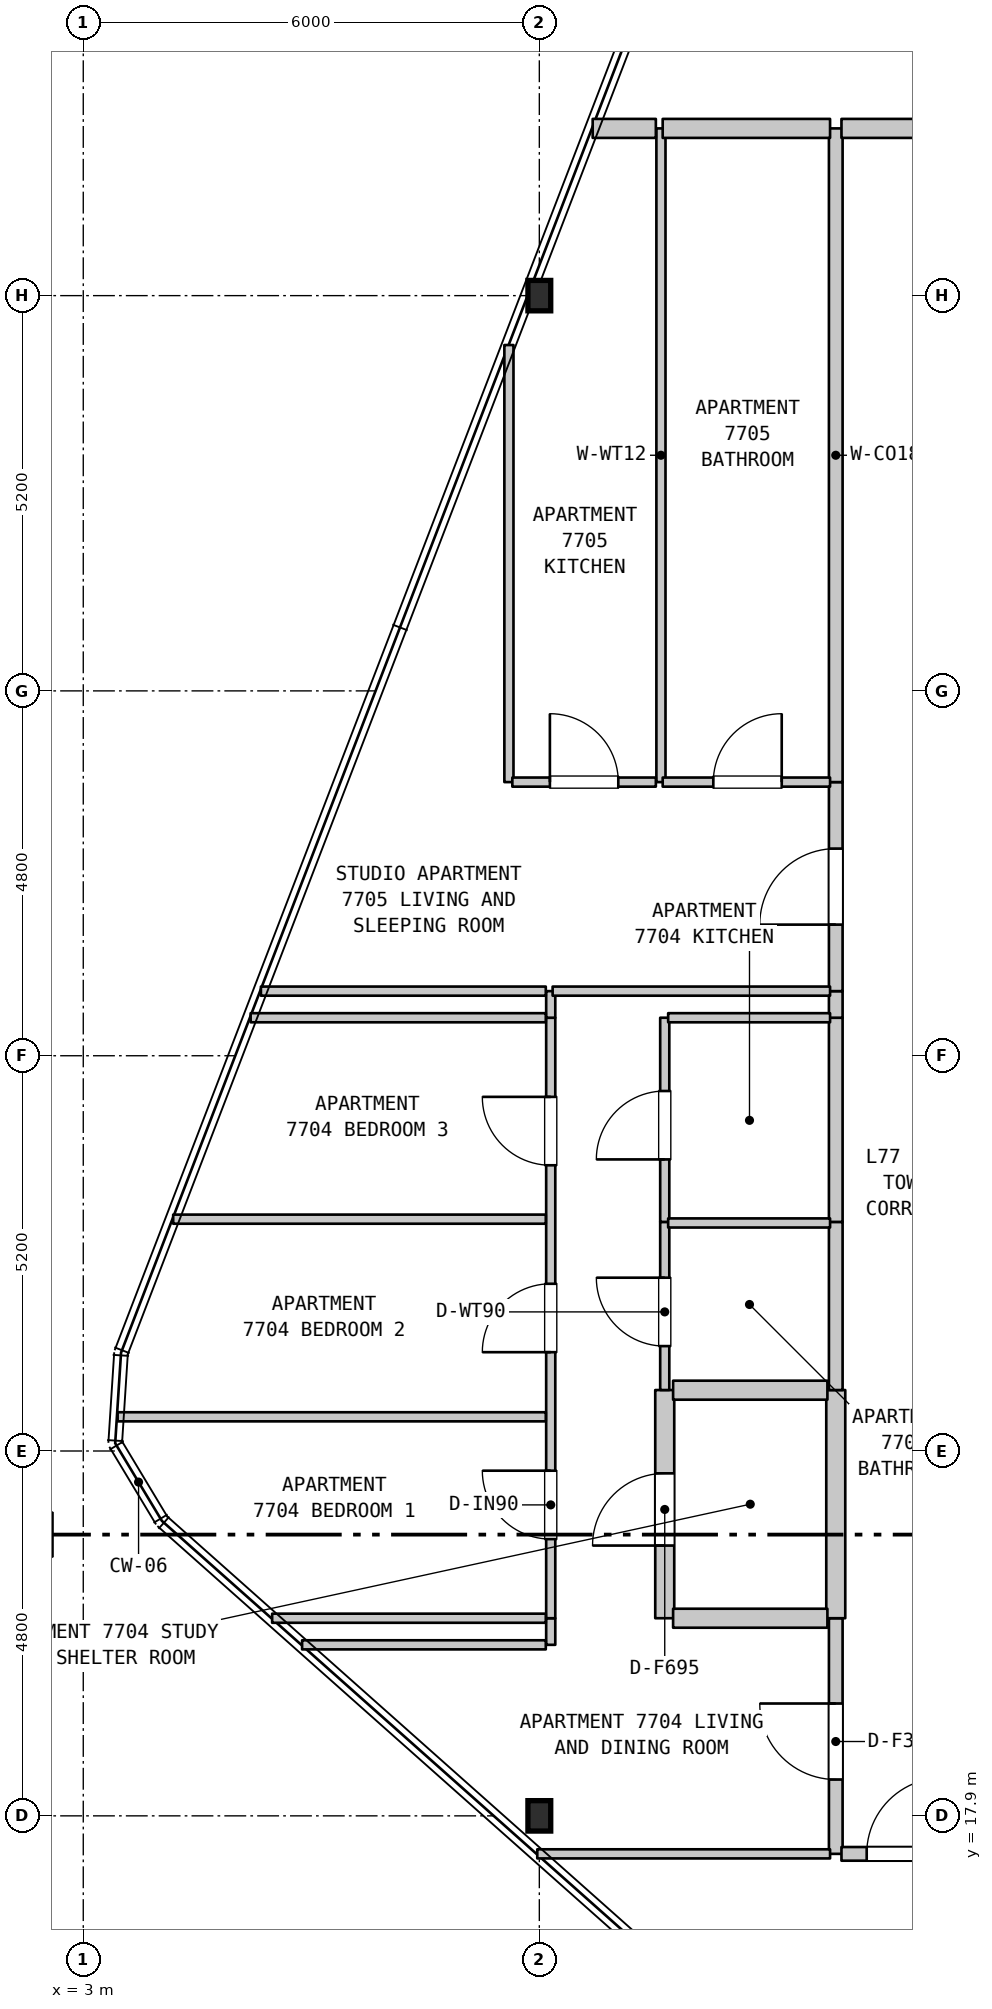
"""IFC4 building model, lengths in metres.
Left out: names, types, materials, properties, quantities, classifications, styles, units other than length and angle.
Written with IfcOpenShell. Run it as: python <this file> out.ifc"""

import sys

from ifc_helpers import new_model, si_unit, direction, frame, frame_2d, origin, origin_2d, place, context, subcontext, project, spatial, rectangle, i_section, extrude, element, fill, save


model = new_model("IFC4")
c1 = context("Model", 3, precision=1e-05, world=origin(), true_north=direction((0.0, 1.0)))
c2 = subcontext(c1, "Body", "Model", "MODEL_VIEW")
j1 = project(units=[si_unit("LENGTHUNIT", "METRE"), si_unit("PLANEANGLEUNIT", "RADIAN")], contexts=[c1])
p1 = place(None, origin())
s1 = spatial("IfcSite", under=j1, at=p1, CompositionType="ELEMENT")
p2 = place(p1, origin())
s2 = spatial("IfcBuilding", under=s1, at=p2, CompositionType="ELEMENT")
p3 = place(p2, frame((0.0, 0.0, 307.3)))
s3 = spatial("IfcBuildingStorey", under=s2, at=p3, CompositionType="ELEMENT", Elevation=307.3)
for number, where, z_axis, x_axis in (
    (1, (9.0, 17.9, 0.0), (0.0, 0.0, 1.0), (1.0, 0.0, 0.0)),
    (2, (9.0, 37.9, 0.0), (0.0, 0.0, 1.0), (1.0, 0.0, 0.0)),
):
    element("IfcColumn", number, at=place(p3, frame(where, z_axis=z_axis, x_axis=x_axis)), inside=s3, PredefinedType="COLUMN", context=c2, shape_type="SweptSolid", body=[
        extrude(i_section(OverallWidth=0.3, OverallDepth=0.4, WebThickness=0.013, FlangeThickness=0.024, FilletRadius=0.027, at=origin_2d()), origin(), (0.0, 0.0, 1.0), 3.7),
    ])
p4 = place(p3, frame((8.6, 31.5, 0.0), z_axis=(0.0, 0.0, 1.0), x_axis=(0.0, 1.0, 0.0)))
e3 = element("IfcWall", 3, at=p4, inside=s3, PredefinedType="PARTITIONING", context=c2, shape_type="SweptSolid", body=[
    extrude(rectangle(XDim=5.75, YDim=0.12, at=frame_2d((2.875, 0.0))), origin(), (0.0, 0.0, 1.0), 3.39),
])
p5 = place(p3, frame((9.15, 20.15, 0.0), z_axis=(0.0, 0.0, 1.0), x_axis=(0.0, 1.0, 0.0)))
e4 = element("IfcWall", 4, at=p5, inside=s3, PredefinedType="PARTITIONING", context=c2, shape_type="SweptSolid", body=[
    extrude(rectangle(XDim=0.35, YDim=0.12, at=frame_2d((0.175, 0.0))), origin(), (0.0, 0.0, 1.0), 3.39),
])
p6 = place(p3, frame((9.15, 20.5, 0.0), z_axis=(0.0, 0.0, 1.0), x_axis=(0.0, 1.0, 0.0)))
e5 = element("IfcWall", 5, at=p6, inside=s3, PredefinedType="PARTITIONING", context=c2, shape_type="SweptSolid", body=[
    extrude(rectangle(XDim=7.9, YDim=0.12, at=frame_2d((3.95, 0.0))), origin(), (0.0, 0.0, 1.0), 2.79),
])
p7 = place(p6, frame((1.041, 0.0, 0.0)))
e6 = element("IfcOpeningElement", 6, at=p7, cuts=e5, PredefinedType="OPENING", context=c2, shape_type="SweptSolid", body=[
    extrude(rectangle(XDim=0.9, YDim=2.15, at=frame_2d((0.45, 1.075))), frame((0.0, 0.07, 0.0), z_axis=(0.0, -1.0, 0.0), x_axis=(1.0, 0.0, 0.0)), (0.0, 0.0, 1.0), 0.14),
])
p8 = place(p6, frame((3.5, 0.0, 0.0)))
e7 = element("IfcOpeningElement", 7, at=p8, cuts=e5, PredefinedType="OPENING", context=c2, shape_type="SweptSolid", body=[
    extrude(rectangle(XDim=0.9, YDim=2.15, at=frame_2d((0.45, 1.075))), frame((0.0, 0.07, 0.0), z_axis=(0.0, -1.0, 0.0), x_axis=(1.0, 0.0, 0.0)), (0.0, 0.0, 1.0), 0.14),
])
p9 = place(p6, frame((5.959, 0.0, 0.0)))
e8 = element("IfcOpeningElement", 8, at=p9, cuts=e5, PredefinedType="OPENING", context=c2, shape_type="SweptSolid", body=[
    extrude(rectangle(XDim=0.9, YDim=2.15, at=frame_2d((0.45, 1.075))), frame((0.0, 0.07, 0.0), z_axis=(0.0, -1.0, 0.0), x_axis=(1.0, 0.0, 0.0)), (0.0, 0.0, 1.0), 0.14),
])
p10 = place(p3, frame((9.15, 28.4, 0.0), z_axis=(0.0, 0.0, 1.0), x_axis=(0.0, 1.0, 0.0)))
e9 = element("IfcWall", 9, at=p10, inside=s3, PredefinedType="PARTITIONING", context=c2, shape_type="SweptSolid", body=[
    extrude(rectangle(XDim=0.35, YDim=0.12, at=frame_2d((0.175, 0.0))), origin(), (0.0, 0.0, 1.0), 3.39),
])
p11 = place(p3, frame((10.6, 31.5, 0.0), z_axis=(0.0, 0.0, 1.0), x_axis=(0.0, 1.0, 0.0)))
e10 = element("IfcWall", 10, at=p11, inside=s3, PredefinedType="PARTITIONING", context=c2, shape_type="SweptSolid", body=[
    extrude(rectangle(XDim=8.6, YDim=0.12, at=frame_2d((4.3, 0.0))), origin(), (0.0, 0.0, 1.0), 3.39),
])
p12 = place(p3, frame((10.65, 20.5, 0.0), z_axis=(0.0, 0.0, 1.0), x_axis=(0.0, 1.0, 0.0)))
e11 = element("IfcWall", 11, at=p12, inside=s3, PredefinedType="STANDARD", context=c2, shape_type="SweptSolid", body=[
    extrude(rectangle(XDim=3.002, YDim=0.25, at=frame_2d((1.501, 0.0))), origin(), (0.0, 0.0, 1.0), 3.39),
])
p13 = place(p12, frame((0.956, 0.0, 0.0)))
e12 = element("IfcOpeningElement", 12, at=p13, cuts=e11, PredefinedType="OPENING", context=c2, shape_type="SweptSolid", body=[
    extrude(rectangle(XDim=0.95, YDim=2.15, at=frame_2d((0.475, 1.075))), frame((0.0, 0.135, 0.0), z_axis=(0.0, -1.0, 0.0), x_axis=(1.0, 0.0, 0.0)), (0.0, 0.0, 1.0), 0.27),
])
p14 = place(p3, frame((10.65, 23.502, 0.0), z_axis=(0.0, 0.0, 1.0), x_axis=(0.0, 1.0, 0.0)))
e13 = element("IfcWall", 13, at=p14, inside=s3, PredefinedType="PARTITIONING", context=c2, shape_type="SweptSolid", body=[
    extrude(rectangle(XDim=2.212, YDim=0.12, at=frame_2d((1.106, 0.0))), origin(), (0.0, 0.0, 1.0), 3.39),
])
p15 = place(p14, frame((0.578, 0.0, 0.0)))
e14 = element("IfcOpeningElement", 14, at=p15, cuts=e13, PredefinedType="OPENING", context=c2, shape_type="SweptSolid", body=[
    extrude(rectangle(XDim=0.9, YDim=2.1, at=frame_2d((0.45, 1.05))), frame((0.0, 0.07, 0.0), z_axis=(0.0, -1.0, 0.0), x_axis=(1.0, 0.0, 0.0)), (0.0, 0.0, 1.0), 0.14),
])
p16 = place(p3, frame((10.65, 25.714, 0.0), z_axis=(0.0, 0.0, 1.0), x_axis=(0.0, 1.0, 0.0)))
e15 = element("IfcWall", 15, at=p16, inside=s3, PredefinedType="PARTITIONING", context=c2, shape_type="SweptSolid", body=[
    extrude(rectangle(XDim=2.686, YDim=0.12, at=frame_2d((1.343, 0.0))), origin(), (0.0, 0.0, 1.0), 3.39),
])
p17 = place(p16, frame((0.822, 0.0, 0.0)))
e16 = element("IfcOpeningElement", 16, at=p17, cuts=e15, PredefinedType="OPENING", context=c2, shape_type="SweptSolid", body=[
    extrude(rectangle(XDim=0.9, YDim=2.15, at=frame_2d((0.45, 1.075))), frame((0.0, 0.07, 0.0), z_axis=(0.0, -1.0, 0.0), x_axis=(1.0, 0.0, 0.0)), (0.0, 0.0, 1.0), 0.14),
])
p18 = place(p3, frame((12.9, 17.4, 0.0), z_axis=(0.0, 0.0, 1.0), x_axis=(0.0, 1.0, 0.0)))
e17 = element("IfcWall", 17, at=p18, inside=s3, PredefinedType="STANDARD", context=c2, shape_type="SweptSolid", body=[
    extrude(rectangle(XDim=3.1, YDim=0.18, at=frame_2d((1.55, 0.0))), origin(), (0.0, 0.0, 1.0), 3.39),
])
p19 = place(p18, frame((0.978, 0.0, 0.0)))
e18 = element("IfcOpeningElement", 18, at=p19, cuts=e17, PredefinedType="OPENING", context=c2, shape_type="SweptSolid", body=[
    extrude(rectangle(XDim=1.0, YDim=2.15, at=frame_2d((0.5, 1.075))), frame((0.0, 0.1, 0.0), z_axis=(0.0, -1.0, 0.0), x_axis=(1.0, 0.0, 0.0)), (0.0, 0.0, 1.0), 0.2),
])
p20 = place(p3, frame((12.9, 20.5, 0.0), z_axis=(0.0, 0.0, 1.0), x_axis=(0.0, 1.0, 0.0)))
e19 = element("IfcWall", 19, at=p20, inside=s3, PredefinedType="STANDARD", context=c2, shape_type="SweptSolid", body=[
    extrude(rectangle(XDim=3.002, YDim=0.25, at=frame_2d((1.501, 0.0))), origin(), (0.0, 0.0, 1.0), 3.39),
])
p21 = place(p3, frame((12.9, 23.502, 0.0), z_axis=(0.0, 0.0, 1.0), x_axis=(0.0, 1.0, 0.0)))
e20 = element("IfcWall", 20, at=p21, inside=s3, PredefinedType="STANDARD", context=c2, shape_type="SweptSolid", body=[
    extrude(rectangle(XDim=2.212, YDim=0.18, at=frame_2d((1.106, 0.0))), origin(), (0.0, 0.0, 1.0), 3.39),
])
p22 = place(p3, frame((12.9, 25.714, 0.0), z_axis=(0.0, 0.0, 1.0), x_axis=(0.0, 1.0, 0.0)))
e21 = element("IfcWall", 21, at=p22, inside=s3, PredefinedType="STANDARD", context=c2, shape_type="SweptSolid", body=[
    extrude(rectangle(XDim=2.686, YDim=0.18, at=frame_2d((1.343, 0.0))), origin(), (0.0, 0.0, 1.0), 3.39),
])
p23 = place(p3, frame((12.9, 28.4, 0.0), z_axis=(0.0, 0.0, 1.0), x_axis=(0.0, 1.0, 0.0)))
e22 = element("IfcWall", 22, at=p23, inside=s3, PredefinedType="STANDARD", context=c2, shape_type="SweptSolid", body=[
    extrude(rectangle(XDim=0.35, YDim=0.18, at=frame_2d((0.175, 0.0))), origin(), (0.0, 0.0, 1.0), 3.39),
])
p24 = place(p3, frame((12.9, 28.75, 0.0), z_axis=(0.0, 0.0, 1.0), x_axis=(0.0, 1.0, 0.0)))
e23 = element("IfcWall", 23, at=p24, inside=s3, PredefinedType="STANDARD", context=c2, shape_type="SweptSolid", body=[
    extrude(rectangle(XDim=2.75, YDim=0.18, at=frame_2d((1.375, 0.0))), origin(), (0.0, 0.0, 1.0), 3.39),
])
p25 = place(p24, frame((0.875, 0.0, 0.0)))
e24 = element("IfcOpeningElement", 24, at=p25, cuts=e23, PredefinedType="OPENING", context=c2, shape_type="SweptSolid", body=[
    extrude(rectangle(XDim=1.0, YDim=2.15, at=frame_2d((0.5, 1.075))), frame((0.0, 0.1, 0.0), z_axis=(0.0, -1.0, 0.0), x_axis=(1.0, 0.0, 0.0)), (0.0, 0.0, 1.0), 0.2),
])
p26 = place(p3, frame((12.9, 31.5, 0.0), z_axis=(0.0, 0.0, 1.0), x_axis=(0.0, 1.0, 0.0)))
e25 = element("IfcWall", 25, at=p26, inside=s3, PredefinedType="STANDARD", context=c2, shape_type="SweptSolid", body=[
    extrude(rectangle(XDim=8.6, YDim=0.18, at=frame_2d((4.3, 0.0))), origin(), (0.0, 0.0, 1.0), 3.39),
])
p27 = place(p3, frame((8.973, 17.4, 0.0), z_axis=(0.0, 0.0, 1.0), x_axis=(1.0, 0.0, 0.0)))
e26 = element("IfcWall", 26, at=p27, inside=s3, PredefinedType="PARTITIONING", context=c2, shape_type="SweptSolid", body=[
    extrude(rectangle(XDim=3.852, YDim=0.12, at=frame_2d((1.926, 0.0))), origin(), (0.0, 0.0, 1.0), 3.39),
])
p28 = place(p3, frame((12.975, 17.4, 0.0), z_axis=(0.0, 0.0, 1.0), x_axis=(1.0, 0.0, 0.0)))
e27 = element("IfcWall", 27, at=p28, inside=s3, PredefinedType="STANDARD", context=c2, shape_type="SweptSolid", body=[
    extrude(rectangle(XDim=3.18, YDim=0.18, at=frame_2d((1.59, 0.0))), origin(), (0.0, 0.0, 1.0), 3.39),
])
p29 = place(p28, frame((0.332, 0.0, 0.0)))
e28 = element("IfcOpeningElement", 28, at=p29, cuts=e27, PredefinedType="OPENING", context=c2, shape_type="SweptSolid", body=[
    extrude(rectangle(XDim=1.0, YDim=2.15, at=frame_2d((0.5, 1.075))), frame((0.0, 0.1, 0.0), z_axis=(0.0, -1.0, 0.0), x_axis=(1.0, 0.0, 0.0)), (0.0, 0.0, 1.0), 0.2),
])
p30 = place(p3, frame((5.879, 20.15, 0.0), z_axis=(0.0, 0.0, 1.0), x_axis=(1.0, 0.0, 0.0)))
e29 = element("IfcWall", 29, at=p30, inside=s3, PredefinedType="PARTITIONING", context=c2, shape_type="SweptSolid", body=[
    extrude(rectangle(XDim=3.206, YDim=0.12, at=frame_2d((1.603, 0.0))), origin(), (0.0, 0.0, 1.0), 3.39),
])
p31 = place(p3, frame((5.485, 20.5, 0.0), z_axis=(0.0, 0.0, 1.0), x_axis=(1.0, 0.0, 0.0)))
e30 = element("IfcWall", 30, at=p31, inside=s3, PredefinedType="PARTITIONING", context=c2, shape_type="SweptSolid", body=[
    extrude(rectangle(XDim=3.6, YDim=0.12, at=frame_2d((1.8, 0.0))), origin(), (0.0, 0.0, 1.0), 3.39),
])
p32 = place(p3, frame((10.76, 20.5, 0.0), z_axis=(0.0, 0.0, 1.0), x_axis=(1.0, 0.0, 0.0)))
e31 = element("IfcWall", 31, at=p32, inside=s3, PredefinedType="STANDARD", context=c2, shape_type="SweptSolid", body=[
    extrude(rectangle(XDim=2.03, YDim=0.25, at=frame_2d((1.015, 0.0))), origin(), (0.0, 0.0, 1.0), 3.39),
])
p33 = place(p3, frame((3.452, 23.15, 0.0), z_axis=(0.0, 0.0, 1.0), x_axis=(1.0, 0.0, 0.0)))
e32 = element("IfcWall", 32, at=p33, inside=s3, PredefinedType="PARTITIONING", context=c2, shape_type="SweptSolid", body=[
    extrude(rectangle(XDim=5.633, YDim=0.12, at=frame_2d((2.816, 0.0))), origin(), (0.0, 0.0, 1.0), 3.39),
])
p34 = place(p3, frame((10.76, 23.5, 0.0), z_axis=(0.0, 0.0, 1.0), x_axis=(1.0, 0.0, 0.0)))
e33 = element("IfcWall", 33, at=p34, inside=s3, PredefinedType="STANDARD", context=c2, shape_type="SweptSolid", body=[
    extrude(rectangle(XDim=2.03, YDim=0.25, at=frame_2d((1.015, 0.0))), origin(), (0.0, 0.0, 1.0), 3.39),
])
p35 = place(p3, frame((10.695, 25.7, 0.0), z_axis=(0.0, 0.0, 1.0), x_axis=(1.0, 0.0, 0.0)))
e34 = element("IfcWall", 34, at=p35, inside=s3, PredefinedType="PARTITIONING", context=c2, shape_type="SweptSolid", body=[
    extrude(rectangle(XDim=2.13, YDim=0.12, at=frame_2d((1.065, 0.0))), origin(), (0.0, 0.0, 1.0), 3.39),
])
p36 = place(p3, frame((4.183, 25.75, 0.0), z_axis=(0.0, 0.0, 1.0), x_axis=(1.0, 0.0, 0.0)))
e35 = element("IfcWall", 35, at=p36, inside=s3, PredefinedType="PARTITIONING", context=c2, shape_type="SweptSolid", body=[
    extrude(rectangle(XDim=4.902, YDim=0.12, at=frame_2d((2.451, 0.0))), origin(), (0.0, 0.0, 1.0), 3.39),
])
p37 = place(p3, frame((5.202, 28.4, 0.0), z_axis=(0.0, 0.0, 1.0), x_axis=(1.0, 0.0, 0.0)))
e36 = element("IfcWall", 36, at=p37, inside=s3, PredefinedType="PARTITIONING", context=c2, shape_type="SweptSolid", body=[
    extrude(rectangle(XDim=3.883, YDim=0.12, at=frame_2d((1.941, 0.0))), origin(), (0.0, 0.0, 1.0), 3.39),
])
p38 = place(p3, frame((10.695, 28.4, 0.0), z_axis=(0.0, 0.0, 1.0), x_axis=(1.0, 0.0, 0.0)))
e37 = element("IfcWall", 37, at=p38, inside=s3, PredefinedType="PARTITIONING", context=c2, shape_type="SweptSolid", body=[
    extrude(rectangle(XDim=2.13, YDim=0.12, at=frame_2d((1.065, 0.0))), origin(), (0.0, 0.0, 1.0), 3.39),
])
p39 = place(p3, frame((5.337, 28.75, 0.0), z_axis=(0.0, 0.0, 1.0), x_axis=(1.0, 0.0, 0.0)))
e38 = element("IfcWall", 38, at=p39, inside=s3, PredefinedType="PARTITIONING", context=c2, shape_type="SweptSolid", body=[
    extrude(rectangle(XDim=3.748, YDim=0.12, at=frame_2d((1.874, 0.0))), origin(), (0.0, 0.0, 1.0), 3.39),
])
p40 = place(p3, frame((9.175, 28.75, 0.0), z_axis=(0.0, 0.0, 1.0), x_axis=(1.0, 0.0, 0.0)))
e39 = element("IfcWall", 39, at=p40, inside=s3, PredefinedType="PARTITIONING", context=c2, shape_type="SweptSolid", body=[
    extrude(rectangle(XDim=3.65, YDim=0.12, at=frame_2d((1.825, 0.0))), origin(), (0.0, 0.0, 1.0), 3.39),
])
p41 = place(p3, frame((8.645, 31.5, 0.0), z_axis=(0.0, 0.0, 1.0), x_axis=(1.0, 0.0, 0.0)))
e40 = element("IfcWall", 40, at=p41, inside=s3, PredefinedType="PARTITIONING", context=c2, shape_type="SweptSolid", body=[
    extrude(rectangle(XDim=1.888, YDim=0.12, at=frame_2d((0.944, 0.0))), origin(), (0.0, 0.0, 1.0), 3.39),
])
p42 = place(p41, frame((0.494, 0.0, 0.0)))
e41 = element("IfcOpeningElement", 41, at=p42, cuts=e40, PredefinedType="OPENING", context=c2, shape_type="SweptSolid", body=[
    extrude(rectangle(XDim=0.9, YDim=2.15, at=frame_2d((0.45, 1.075))), frame((0.0, 0.07, 0.0), z_axis=(0.0, -1.0, 0.0), x_axis=(1.0, 0.0, 0.0)), (0.0, 0.0, 1.0), 0.14),
])
p43 = place(p3, frame((10.623, 31.5, 0.0), z_axis=(0.0, 0.0, 1.0), x_axis=(1.0, 0.0, 0.0)))
e42 = element("IfcWall", 42, at=p43, inside=s3, PredefinedType="PARTITIONING", context=c2, shape_type="SweptSolid", body=[
    extrude(rectangle(XDim=2.202, YDim=0.12, at=frame_2d((1.101, 0.0))), origin(), (0.0, 0.0, 1.0), 3.39),
])
p44 = place(p43, frame((0.666, 0.0, 0.0)))
e43 = element("IfcOpeningElement", 43, at=p44, cuts=e42, PredefinedType="OPENING", context=c2, shape_type="SweptSolid", body=[
    extrude(rectangle(XDim=0.9, YDim=2.1, at=frame_2d((0.45, 1.05))), frame((0.0, 0.07, 0.0), z_axis=(0.0, -1.0, 0.0), x_axis=(1.0, 0.0, 0.0)), (0.0, 0.0, 1.0), 0.14),
])
p45 = place(p3, frame((9.702, 40.1, 0.0), z_axis=(0.0, 0.0, 1.0), x_axis=(1.0, 0.0, 0.0)))
e44 = element("IfcWall", 44, at=p45, inside=s3, PredefinedType="STANDARD", context=c2, shape_type="SweptSolid", body=[
    extrude(rectangle(XDim=0.831, YDim=0.25, at=frame_2d((0.416, 0.0))), origin(), (0.0, 0.0, 1.0), 3.39),
])
p46 = place(p3, frame((10.623, 40.1, 0.0), z_axis=(0.0, 0.0, 1.0), x_axis=(1.0, 0.0, 0.0)))
e45 = element("IfcWall", 45, at=p46, inside=s3, PredefinedType="STANDARD", context=c2, shape_type="SweptSolid", body=[
    extrude(rectangle(XDim=2.202, YDim=0.25, at=frame_2d((1.101, 0.0))), origin(), (0.0, 0.0, 1.0), 3.39),
])
p47 = place(p3, frame((12.975, 40.1, 0.0), z_axis=(0.0, 0.0, 1.0), x_axis=(1.0, 0.0, 0.0)))
e46 = element("IfcWall", 46, at=p47, inside=s3, PredefinedType="STANDARD", context=c2, shape_type="SweptSolid", body=[
    extrude(rectangle(XDim=1.48, YDim=0.25, at=frame_2d((0.74, 0.0))), origin(), (0.0, 0.0, 1.0), 3.39),
])
p48 = place(p7, origin())
e47 = element("IfcDoor", 47, at=p48, inside=s3, OperationType="SINGLE_SWING_RIGHT", PredefinedType="DOOR", context=c2, shape_type="SweptSolid", body=[
    extrude(rectangle(XDim=0.9, YDim=2.15, at=frame_2d((0.45, 1.075))), frame((0.0, 0.025, 0.0), z_axis=(0.0, -1.0, 0.0), x_axis=(1.0, 0.0, 0.0)), (0.0, 0.0, 1.0), 0.05),
])
fill(e6, e47)
p49 = place(p8, origin())
e48 = element("IfcDoor", 48, at=p49, inside=s3, OperationType="SINGLE_SWING_LEFT", PredefinedType="DOOR", context=c2, shape_type="SweptSolid", body=[
    extrude(rectangle(XDim=0.9, YDim=2.15, at=frame_2d((0.45, 1.075))), frame((0.0, 0.025, 0.0), z_axis=(0.0, -1.0, 0.0), x_axis=(1.0, 0.0, 0.0)), (0.0, 0.0, 1.0), 0.05),
])
fill(e7, e48)
p50 = place(p9, origin())
e49 = element("IfcDoor", 49, at=p50, inside=s3, OperationType="SINGLE_SWING_RIGHT", PredefinedType="DOOR", context=c2, shape_type="SweptSolid", body=[
    extrude(rectangle(XDim=0.9, YDim=2.15, at=frame_2d((0.45, 1.075))), frame((0.0, 0.025, 0.0), z_axis=(0.0, -1.0, 0.0), x_axis=(1.0, 0.0, 0.0)), (0.0, 0.0, 1.0), 0.05),
])
fill(e8, e49)
p51 = place(p13, origin())
e50 = element("IfcDoor", 50, at=p51, inside=s3, OperationType="SINGLE_SWING_LEFT", PredefinedType="DOOR", context=c2, shape_type="SweptSolid", body=[
    extrude(rectangle(XDim=0.95, YDim=2.15, at=frame_2d((0.475, 1.075))), frame((0.0, 0.025, 0.0), z_axis=(0.0, -1.0, 0.0), x_axis=(1.0, 0.0, 0.0)), (0.0, 0.0, 1.0), 0.05),
])
fill(e12, e50)
p52 = place(p15, origin())
e51 = element("IfcDoor", 51, at=p52, inside=s3, OperationType="SINGLE_SWING_RIGHT", PredefinedType="DOOR", context=c2, shape_type="SweptSolid", body=[
    extrude(rectangle(XDim=0.9, YDim=2.1, at=frame_2d((0.45, 1.05))), frame((0.0, 0.025, 0.0), z_axis=(0.0, -1.0, 0.0), x_axis=(1.0, 0.0, 0.0)), (0.0, 0.0, 1.0), 0.05),
])
fill(e14, e51)
p53 = place(p17, origin())
e52 = element("IfcDoor", 52, at=p53, inside=s3, OperationType="SINGLE_SWING_LEFT", PredefinedType="DOOR", context=c2, shape_type="SweptSolid", body=[
    extrude(rectangle(XDim=0.9, YDim=2.15, at=frame_2d((0.45, 1.075))), frame((0.0, 0.025, 0.0), z_axis=(0.0, -1.0, 0.0), x_axis=(1.0, 0.0, 0.0)), (0.0, 0.0, 1.0), 0.05),
])
fill(e16, e52)
p54 = place(p19, origin())
e53 = element("IfcDoor", 53, at=p54, inside=s3, OperationType="SINGLE_SWING_RIGHT", PredefinedType="DOOR", context=c2, shape_type="SweptSolid", body=[
    extrude(rectangle(XDim=1.0, YDim=2.15, at=frame_2d((0.5, 1.075))), frame((0.0, 0.025, 0.0), z_axis=(0.0, -1.0, 0.0), x_axis=(1.0, 0.0, 0.0)), (0.0, 0.0, 1.0), 0.05),
])
fill(e18, e53)
p55 = place(p25, origin())
e54 = element("IfcDoor", 54, at=p55, inside=s3, OperationType="SINGLE_SWING_LEFT", PredefinedType="DOOR", context=c2, shape_type="SweptSolid", body=[
    extrude(rectangle(XDim=1.0, YDim=2.15, at=frame_2d((0.5, 1.075))), frame((0.0, 0.025, 0.0), z_axis=(0.0, -1.0, 0.0), x_axis=(1.0, 0.0, 0.0)), (0.0, 0.0, 1.0), 0.05),
])
fill(e24, e54)
p56 = place(p29, origin())
e55 = element("IfcDoor", 55, at=p56, inside=s3, OperationType="SINGLE_SWING_RIGHT", PredefinedType="DOOR", context=c2, shape_type="SweptSolid", body=[
    extrude(rectangle(XDim=1.0, YDim=2.15, at=frame_2d((0.5, 1.075))), frame((0.0, 0.025, 0.0), z_axis=(0.0, -1.0, 0.0), x_axis=(1.0, 0.0, 0.0)), (0.0, 0.0, 1.0), 0.05),
])
fill(e28, e55)
p57 = place(p42, origin())
e56 = element("IfcDoor", 56, at=p57, inside=s3, OperationType="SINGLE_SWING_LEFT", PredefinedType="DOOR", context=c2, shape_type="SweptSolid", body=[
    extrude(rectangle(XDim=0.9, YDim=2.15, at=frame_2d((0.45, 1.075))), frame((0.0, 0.025, 0.0), z_axis=(0.0, -1.0, 0.0), x_axis=(1.0, 0.0, 0.0)), (0.0, 0.0, 1.0), 0.05),
])
fill(e41, e56)
p58 = place(p44, origin())
e57 = element("IfcDoor", 57, at=p58, inside=s3, OperationType="SINGLE_SWING_RIGHT", PredefinedType="DOOR", context=c2, shape_type="SweptSolid", body=[
    extrude(rectangle(XDim=0.9, YDim=2.1, at=frame_2d((0.45, 1.05))), frame((0.0, 0.025, 0.0), z_axis=(0.0, -1.0, 0.0), x_axis=(1.0, 0.0, 0.0)), (0.0, 0.0, 1.0), 0.05),
])
fill(e43, e57)
save(model, sys.argv[1])
